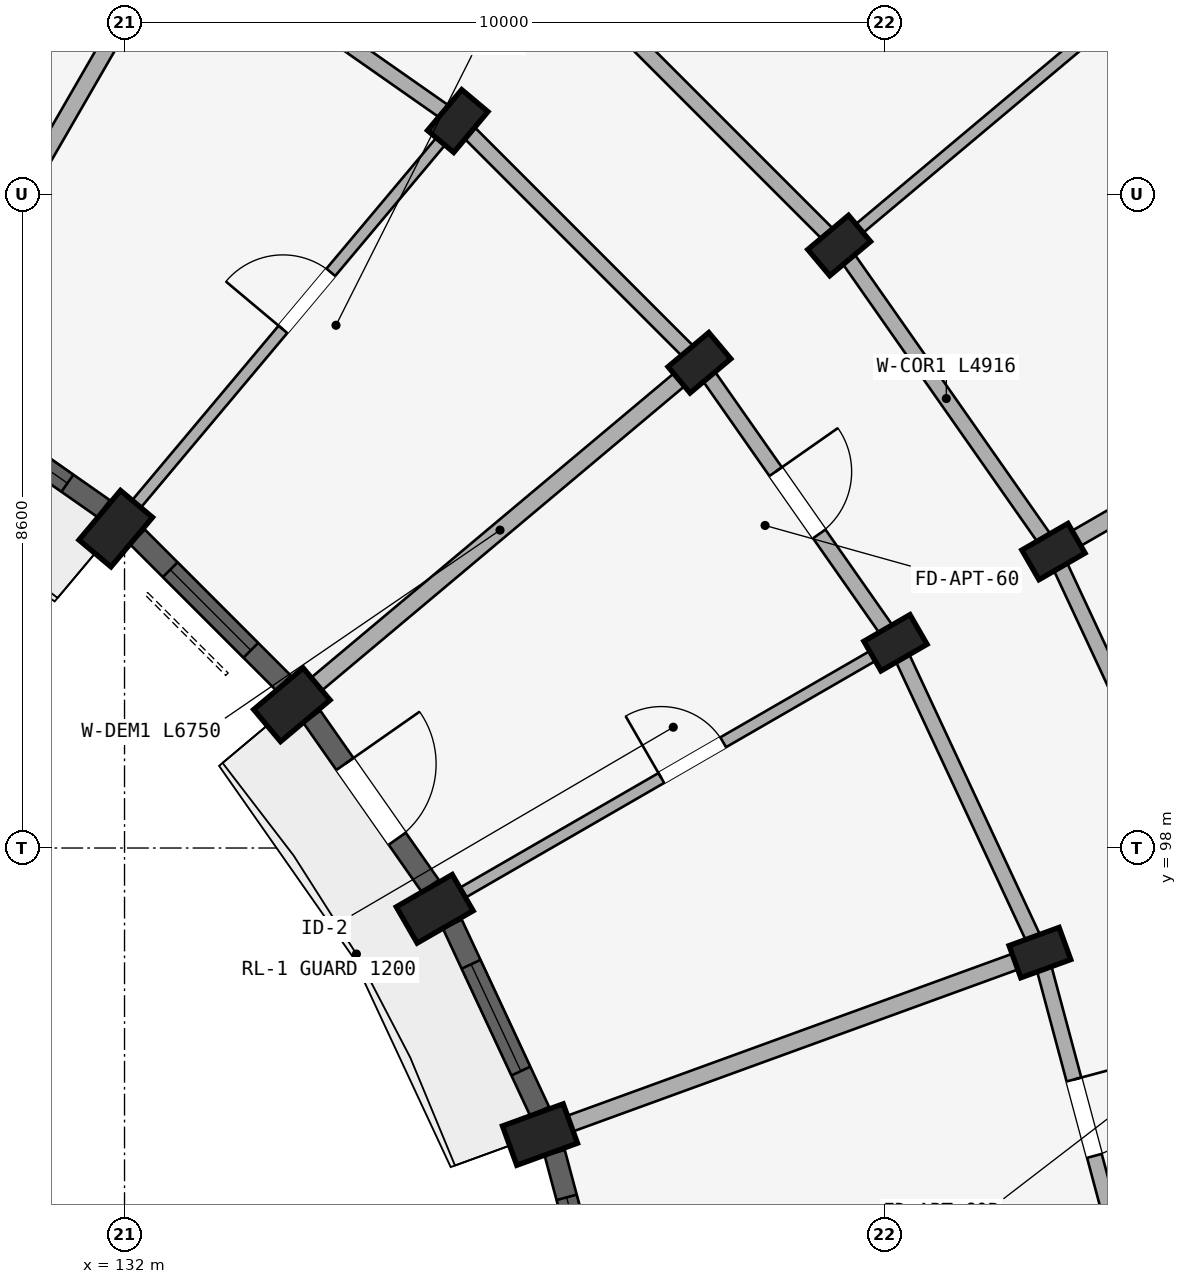
"""IFC4 building model, lengths in metres.
Left out: names, types, materials, properties, quantities, classifications, styles, units other than length and angle.
Written with IfcOpenShell. Run it as: python <this file> out.ifc"""

import sys

from ifc_helpers import new_model, si_unit, direction, frame, frame_2d, origin, origin_2d, place, context, subcontext, project, spatial, rectangle, extrude, element, fill, save


model = new_model("IFC4")
c1 = context("Model", 3, precision=1e-05, world=origin(), true_north=direction((0.0, 1.0)))
c2 = subcontext(c1, "Body", "Model", "MODEL_VIEW")
j1 = project(units=[si_unit("LENGTHUNIT", "METRE"), si_unit("PLANEANGLEUNIT", "RADIAN")], contexts=[c1])
p1 = place(None, origin())
s1 = spatial("IfcSite", under=j1, at=p1, CompositionType="ELEMENT")
p2 = place(p1, origin())
s2 = spatial("IfcBuilding", under=s1, at=p2, CompositionType="ELEMENT")
p3 = place(p2, frame((0.0, 0.0, 11.85)))
s3 = spatial("IfcBuildingStorey", under=s2, at=p3, CompositionType="ELEMENT", Elevation=11.85)
p4 = place(p3, frame((131.885, 102.202, 0.0), z_axis=(0.0, 0.0, 1.0), x_axis=(-0.766044443119, 0.642787609687, 0.0)))
e1 = element("IfcColumn", 1, at=p4, inside=s3, PredefinedType="COLUMN", context=c2, shape_type="SweptSolid", body=[
    extrude(rectangle(XDim=0.55, YDim=0.85, at=origin_2d()), origin(), (0.0, 0.0, 1.0), 2.93),
])
p5 = place(p3, frame((136.384, 107.564, 0.0), z_axis=(0.0, 0.0, 1.0), x_axis=(-0.766044443119, 0.642787609687, 0.0)))
e2 = element("IfcColumn", 2, at=p5, inside=s3, PredefinedType="COLUMN", context=c2, shape_type="SweptSolid", body=[
    extrude(rectangle(XDim=0.45, YDim=0.7, at=origin_2d()), origin(), (0.0, 0.0, 1.0), 2.93),
])
p6 = place(p3, frame((134.202, 99.885, 0.0), z_axis=(0.0, 0.0, 1.0), x_axis=(-0.642787609687, 0.766044443119, 0.0)))
e3 = element("IfcColumn", 3, at=p6, inside=s3, PredefinedType="COLUMN", context=c2, shape_type="SweptSolid", body=[
    extrude(rectangle(XDim=0.55, YDim=0.85, at=origin_2d()), origin(), (0.0, 0.0, 1.0), 2.93),
])
for number, where, z_axis, x_axis in (
    (4, (139.564, 104.384, 0.0), (0.0, 0.0, 1.0), (-0.643, 0.766, 0.0)),
    (5, (141.402, 105.927, 0.0), (0.0, 0.0, 1.0), (-0.643, 0.766, 0.0)),
):
    element("IfcColumn", number, at=place(p3, frame(where, z_axis=z_axis, x_axis=x_axis)), inside=s3, PredefinedType="COLUMN", context=c2, shape_type="SweptSolid", body=[
        extrude(rectangle(XDim=0.45, YDim=0.7, at=origin_2d()), origin(), (0.0, 0.0, 1.0), 2.93),
    ])
p7 = place(p3, frame((136.081, 97.2, 0.0), z_axis=(0.0, 0.0, 1.0), x_axis=(-0.5, 0.866025403784, 0.0)))
e6 = element("IfcColumn", 6, at=p7, inside=s3, PredefinedType="COLUMN", context=c2, shape_type="SweptSolid", body=[
    extrude(rectangle(XDim=0.55, YDim=0.85, at=origin_2d()), origin(), (0.0, 0.0, 1.0), 2.93),
])
for number, where, z_axis, x_axis in (
    (7, (142.144, 100.7, 0.0), (0.0, 0.0, 1.0), (-0.5, 0.866, 0.0)),
    (8, (144.222, 101.9, 0.0), (0.0, 0.0, 1.0), (-0.5, 0.866, 0.0)),
):
    element("IfcColumn", number, at=place(p3, frame(where, z_axis=z_axis, x_axis=x_axis)), inside=s3, PredefinedType="COLUMN", context=c2, shape_type="SweptSolid", body=[
        extrude(rectangle(XDim=0.45, YDim=0.7, at=origin_2d()), origin(), (0.0, 0.0, 1.0), 2.93),
    ])
p8 = place(p3, frame((137.466, 94.23, 0.0), z_axis=(0.0, 0.0, 1.0), x_axis=(-0.342020143326, 0.939692620786, 0.0)))
e9 = element("IfcColumn", 9, at=p8, inside=s3, PredefinedType="COLUMN", context=c2, shape_type="SweptSolid", body=[
    extrude(rectangle(XDim=0.55, YDim=0.85, at=origin_2d()), origin(), (0.0, 0.0, 1.0), 2.93),
])
p9 = place(p3, frame((144.044, 96.624, 0.0), z_axis=(0.0, 0.0, 1.0), x_axis=(-0.342020143326, 0.939692620786, 0.0)))
e10 = element("IfcColumn", 10, at=p9, inside=s3, PredefinedType="COLUMN", context=c2, shape_type="SweptSolid", body=[
    extrude(rectangle(XDim=0.45, YDim=0.7, at=origin_2d()), origin(), (0.0, 0.0, 1.0), 2.93),
])
p10 = place(p3, frame((132.7, 110.144, 0.0), z_axis=(0.0, 0.0, 1.0), x_axis=(0.819155404658, -0.573571637217, 0.0)))
e11 = element("IfcWall", 11, at=p10, inside=s3, PredefinedType="STANDARD", context=c2, shape_type="SweptSolid", body=[
    extrude(rectangle(XDim=4.497, YDim=0.2, at=frame_2d((2.249, 0.0))), origin(), (0.0, 0.0, 1.0), 2.372),
])
p11 = place(p10, frame((1.709, 0.0, 0.0)))
e12 = element("IfcOpeningElement", 12, at=p11, cuts=e11, PredefinedType="OPENING", context=c2, shape_type="SweptSolid", body=[
    extrude(rectangle(XDim=1.08, YDim=2.15, at=frame_2d((0.54, 1.075))), frame((0.0, 0.11, 0.0), z_axis=(0.0, -1.0, 0.0), x_axis=(1.0, 0.0, 0.0)), (0.0, 0.0, 1.0), 0.22),
])
p12 = place(p3, frame((136.384, 107.564, 0.0), z_axis=(0.0, 0.0, 1.0), x_axis=(0.707106781187, -0.707106781187, 0.0)))
e13 = element("IfcWall", 13, at=p12, inside=s3, PredefinedType="STANDARD", context=c2, shape_type="SweptSolid", body=[
    extrude(rectangle(XDim=4.497, YDim=0.2, at=frame_2d((2.249, 0.0))), origin(), (0.0, 0.0, 1.0), 2.372),
])
p13 = place(p3, frame((137.927, 109.402, 0.0), z_axis=(0.0, 0.0, 1.0), x_axis=(0.707106781187, -0.707106781187, 0.0)))
e14 = element("IfcWall", 14, at=p13, inside=s3, PredefinedType="STANDARD", context=c2, shape_type="SweptSolid", body=[
    extrude(rectangle(XDim=4.916, YDim=0.2, at=frame_2d((2.458, 0.0))), origin(), (0.0, 0.0, 1.0), 2.372),
])
p14 = place(p3, frame((139.564, 104.384, 0.0), z_axis=(0.0, 0.0, 1.0), x_axis=(0.573571637217, -0.819155404658, 0.0)))
e15 = element("IfcWall", 15, at=p14, inside=s3, PredefinedType="STANDARD", context=c2, shape_type="SweptSolid", body=[
    extrude(rectangle(XDim=4.497, YDim=0.2, at=frame_2d((2.249, 0.0))), origin(), (0.0, 0.0, 1.0), 2.372),
])
p15 = place(p14, frame((1.749, 0.0, 0.0)))
e16 = element("IfcOpeningElement", 16, at=p15, cuts=e15, PredefinedType="OPENING", context=c2, shape_type="SweptSolid", body=[
    extrude(rectangle(XDim=1.0, YDim=2.15, at=frame_2d((0.5, 1.075))), frame((0.0, 0.11, 0.0), z_axis=(0.0, -1.0, 0.0), x_axis=(1.0, 0.0, 0.0)), (0.0, 0.0, 1.0), 0.22),
])
p16 = place(p3, frame((141.402, 105.927, 0.0), z_axis=(0.0, 0.0, 1.0), x_axis=(0.573592335331, -0.819140911474, 0.0)))
e17 = element("IfcWall", 17, at=p16, inside=s3, PredefinedType="STANDARD", context=c2, shape_type="SweptSolid", body=[
    extrude(rectangle(XDim=4.916, YDim=0.2, at=frame_2d((2.458, 0.0))), origin(), (0.0, 0.0, 1.0), 2.372),
])
p17 = place(p3, frame((142.144, 100.7, 0.0), z_axis=(0.0, 0.0, 1.0), x_axis=(0.422617978463, -0.906307919131, 0.0)))
e18 = element("IfcWall", 18, at=p17, inside=s3, PredefinedType="STANDARD", context=c2, shape_type="SweptSolid", body=[
    extrude(rectangle(XDim=4.497, YDim=0.2, at=frame_2d((2.249, 0.0))), origin(), (0.0, 0.0, 1.0), 2.372),
])
p18 = place(p3, frame((144.222, 101.9, 0.0), z_axis=(0.0, 0.0, 1.0), x_axis=(0.422629854778, -0.906302381024, 0.0)))
e19 = element("IfcWall", 19, at=p18, inside=s3, PredefinedType="STANDARD", context=c2, shape_type="SweptSolid", body=[
    extrude(rectangle(XDim=4.915, YDim=0.2, at=frame_2d((2.458, 0.0))), origin(), (0.0, 0.0, 1.0), 2.372),
])
p19 = place(p18, frame((1.958, 0.0, 0.0)))
e20 = element("IfcOpeningElement", 20, at=p19, cuts=e19, PredefinedType="OPENING", context=c2, shape_type="SweptSolid", body=[
    extrude(rectangle(XDim=1.0, YDim=2.15, at=frame_2d((0.5, 1.075))), frame((0.0, 0.11, 0.0), z_axis=(0.0, -1.0, 0.0), x_axis=(1.0, 0.0, 0.0)), (0.0, 0.0, 1.0), 0.22),
])
p20 = place(p3, frame((144.044, 96.624, 0.0), z_axis=(0.0, 0.0, 1.0), x_axis=(0.258787642463, -0.965934240054, 0.0)))
e21 = element("IfcWall", 21, at=p20, inside=s3, PredefinedType="STANDARD", context=c2, shape_type="SweptSolid", body=[
    extrude(rectangle(XDim=4.497, YDim=0.2, at=frame_2d((2.249, 0.0))), origin(), (0.0, 0.0, 1.0), 2.372),
])
p21 = place(p20, frame((1.729, 0.0, 0.0)))
e22 = element("IfcOpeningElement", 22, at=p21, cuts=e21, PredefinedType="OPENING", context=c2, shape_type="SweptSolid", body=[
    extrude(rectangle(XDim=1.04, YDim=2.15, at=frame_2d((0.52, 1.075))), frame((0.0, 0.11, 0.0), z_axis=(0.0, -1.0, 0.0), x_axis=(1.0, 0.0, 0.0)), (0.0, 0.0, 1.0), 0.22),
])
p22 = place(p3, frame((129.3, 104.254, 0.0), z_axis=(0.0, 0.0, 1.0), x_axis=(0.499997969693, 0.866026575979, 0.0)))
e23 = element("IfcWall", 23, at=p22, inside=s3, PredefinedType="STANDARD", context=c2, shape_type="SweptSolid", body=[
    extrude(rectangle(XDim=6.75, YDim=0.22, at=frame_2d((3.375, 0.0))), origin(), (0.0, 0.0, 1.0), 2.372),
])
p23 = place(p3, frame((132.013, 102.355, 0.0), z_axis=(0.0, 0.0, 1.0), x_axis=(0.642784846501, 0.766046761698, 0.0)))
e24 = element("IfcWall", 24, at=p23, inside=s3, PredefinedType="PARTITIONING", context=c2, shape_type="SweptSolid", body=[
    extrude(rectangle(XDim=6.75, YDim=0.15, at=frame_2d((3.375, 0.0))), origin(), (0.0, 0.0, 1.0), 2.372),
])
p24 = place(p23, frame((3.222, 0.0, 0.0)))
e25 = element("IfcOpeningElement", 25, at=p24, cuts=e24, PredefinedType="OPENING", context=c2, shape_type="SweptSolid", body=[
    extrude(rectangle(XDim=0.98, YDim=2.12, at=frame_2d((0.49, 1.06))), frame((0.0, 0.085, 0.0), z_axis=(0.0, -1.0, 0.0), x_axis=(1.0, 0.0, 0.0)), (0.0, 0.0, 1.0), 0.17),
])
p25 = place(p3, frame((134.355, 100.013, 0.0), z_axis=(0.0, 0.0, 1.0), x_axis=(0.766046761698, 0.642784846501, 0.0)))
e26 = element("IfcWall", 26, at=p25, inside=s3, PredefinedType="STANDARD", context=c2, shape_type="SweptSolid", body=[
    extrude(rectangle(XDim=6.75, YDim=0.22, at=frame_2d((3.375, 0.0))), origin(), (0.0, 0.0, 1.0), 2.372),
])
p26 = place(p3, frame((141.479, 105.991, 0.0), z_axis=(0.0, 0.0, 1.0), x_axis=(0.766046835987, 0.642784757967, 0.0)))
e27 = element("IfcWall", 27, at=p26, inside=s3, PredefinedType="PARTITIONING", context=c2, shape_type="SweptSolid", body=[
    extrude(rectangle(XDim=17.42, YDim=0.15, at=frame_2d((8.71, 0.0))), origin(), (0.0, 0.0, 1.0), 2.372),
])
p27 = place(p26, frame((4.45, 0.0, 0.0)))
e28 = element("IfcOpeningElement", 28, at=p27, cuts=e27, PredefinedType="OPENING", context=c2, shape_type="SweptSolid", body=[
    extrude(rectangle(XDim=0.8, YDim=2.1, at=frame_2d((0.4, 1.05))), frame((0.0, 0.085, 0.0), z_axis=(0.0, -1.0, 0.0), x_axis=(1.0, 0.0, 0.0)), (0.0, 0.0, 1.0), 0.17),
])
p28 = place(p3, frame((136.254, 97.3, 0.0), z_axis=(0.0, 0.0, 1.0), x_axis=(0.866026575979, 0.499997969693, 0.0)))
e29 = element("IfcWall", 29, at=p28, inside=s3, PredefinedType="PARTITIONING", context=c2, shape_type="SweptSolid", body=[
    extrude(rectangle(XDim=6.75, YDim=0.15, at=frame_2d((3.375, 0.0))), origin(), (0.0, 0.0, 1.0), 2.372),
])
p29 = place(p28, frame((3.242, 0.0, 0.0)))
e30 = element("IfcOpeningElement", 30, at=p29, cuts=e29, PredefinedType="OPENING", context=c2, shape_type="SweptSolid", body=[
    extrude(rectangle(XDim=0.94, YDim=2.1, at=frame_2d((0.47, 1.05))), frame((0.0, 0.085, 0.0), z_axis=(0.0, -1.0, 0.0), x_axis=(1.0, 0.0, 0.0)), (0.0, 0.0, 1.0), 0.17),
])
p30 = place(p3, frame((144.309, 101.95, 0.0), z_axis=(0.0, 0.0, 1.0), x_axis=(0.866026648973, 0.499997843263, 0.0)))
e31 = element("IfcWall", 31, at=p30, inside=s3, PredefinedType="STANDARD", context=c2, shape_type="SweptSolid", body=[
    extrude(rectangle(XDim=17.42, YDim=0.23, at=frame_2d((8.71, 0.0))), origin(), (0.0, 0.0, 1.0), 2.372),
])
p31 = place(p3, frame((137.654, 94.298, 0.0), z_axis=(0.0, 0.0, 1.0), x_axis=(0.939696231917, 0.342010221662, 0.0)))
e32 = element("IfcWall", 32, at=p31, inside=s3, PredefinedType="STANDARD", context=c2, shape_type="SweptSolid", body=[
    extrude(rectangle(XDim=6.75, YDim=0.22, at=frame_2d((3.375, 0.0))), origin(), (0.0, 0.0, 1.0), 2.372),
])
p32 = place(p3, frame((129.501, 104.023, 0.0), z_axis=(0.0, 0.0, 1.0), x_axis=(0.81917282593, -0.573546755948, 0.0)))
e33 = element("IfcWall", 33, at=p32, inside=s3, PredefinedType="STANDARD", context=c2, shape_type="SweptSolid", body=[
    extrude(rectangle(XDim=2.718, YDim=0.275, at=frame_2d((1.359, 0.0))), origin(), (0.0, 0.0, 1.0), 2.422),
])
p33 = place(p32, frame((0.584, 0.0, 0.622)))
e34 = element("IfcOpeningElement", 34, at=p33, cuts=e33, PredefinedType="OPENING", context=c2, shape_type="SweptSolid", body=[
    extrude(rectangle(XDim=1.55, YDim=1.6, at=frame_2d((0.775, 0.8))), frame((0.0, 0.147, 0.0), z_axis=(0.0, -1.0, 0.0), x_axis=(1.0, 0.0, 0.0)), (0.0, 0.0, 1.0), 0.295),
])
p34 = place(p3, frame((132.171, 102.092, 0.0), z_axis=(0.0, 0.0, 1.0), x_axis=(0.707106781187, -0.707106781187, 0.0)))
e35 = element("IfcWall", 35, at=p34, inside=s3, PredefinedType="STANDARD", context=c2, shape_type="SweptSolid", body=[
    extrude(rectangle(XDim=2.718, YDim=0.275, at=frame_2d((1.359, 0.0))), origin(), (0.0, 0.0, 1.0), 2.422),
])
p35 = place(p34, frame((0.609, 0.0, 0.572)))
e36 = element("IfcOpeningElement", 36, at=p35, cuts=e35, PredefinedType="OPENING", context=c2, shape_type="SweptSolid", body=[
    extrude(rectangle(XDim=1.5, YDim=1.65, at=frame_2d((0.75, 0.825))), frame((0.0, 0.147, 0.0), z_axis=(0.0, -1.0, 0.0), x_axis=(1.0, 0.0, 0.0)), (0.0, 0.0, 1.0), 0.295),
])
p36 = place(p3, frame((134.465, 99.727, 0.0), z_axis=(0.0, 0.0, 1.0), x_axis=(0.573546755948, -0.81917282593, 0.0)))
e37 = element("IfcWall", 37, at=p36, inside=s3, PredefinedType="STANDARD", context=c2, shape_type="SweptSolid", body=[
    extrude(rectangle(XDim=2.718, YDim=0.275, at=frame_2d((1.359, 0.0))), origin(), (0.0, 0.0, 1.0), 2.422),
])
p37 = place(p36, frame((0.759, 0.0, 0.0)))
e38 = element("IfcOpeningElement", 38, at=p37, cuts=e37, PredefinedType="OPENING", context=c2, shape_type="SweptSolid", body=[
    extrude(rectangle(XDim=1.2, YDim=2.15, at=frame_2d((0.6, 1.075))), frame((0.0, 0.147, 0.0), z_axis=(0.0, -1.0, 0.0), x_axis=(1.0, 0.0, 0.0)), (0.0, 0.0, 1.0), 0.295),
])
p38 = place(p3, frame((136.313, 96.999, 0.0), z_axis=(0.0, 0.0, 1.0), x_axis=(0.422610022166, -0.906311629168, 0.0)))
e39 = element("IfcWall", 39, at=p38, inside=s3, PredefinedType="STANDARD", context=c2, shape_type="SweptSolid", body=[
    extrude(rectangle(XDim=2.718, YDim=0.275, at=frame_2d((1.359, 0.0))), origin(), (0.0, 0.0, 1.0), 2.422),
])
p39 = place(p38, frame((0.584, 0.0, 0.622)))
e40 = element("IfcOpeningElement", 40, at=p39, cuts=e39, PredefinedType="OPENING", context=c2, shape_type="SweptSolid", body=[
    extrude(rectangle(XDim=1.55, YDim=1.6, at=frame_2d((0.775, 0.8))), frame((0.0, 0.147, 0.0), z_axis=(0.0, -1.0, 0.0), x_axis=(1.0, 0.0, 0.0)), (0.0, 0.0, 1.0), 0.295),
])
p40 = place(p3, frame((137.659, 93.992, 0.0), z_axis=(0.0, 0.0, 1.0), x_axis=(0.258819907011, -0.965925595341, 0.0)))
e41 = element("IfcWall", 41, at=p40, inside=s3, PredefinedType="STANDARD", context=c2, shape_type="SweptSolid", body=[
    extrude(rectangle(XDim=2.718, YDim=0.275, at=frame_2d((1.359, 0.0))), origin(), (0.0, 0.0, 1.0), 2.422),
])
p41 = place(p40, frame((0.609, 0.0, 0.572)))
e42 = element("IfcOpeningElement", 42, at=p41, cuts=e41, PredefinedType="OPENING", context=c2, shape_type="SweptSolid", body=[
    extrude(rectangle(XDim=1.5, YDim=1.65, at=frame_2d((0.75, 0.825))), frame((0.0, 0.147, 0.0), z_axis=(0.0, -1.0, 0.0), x_axis=(1.0, 0.0, 0.0)), (0.0, 0.0, 1.0), 0.295),
])
p42 = place(p33, origin())
e43 = element("IfcWindow", 43, at=p42, inside=s3, PartitioningType="DOUBLE_PANEL_VERTICAL", PredefinedType="WINDOW", context=c2, shape_type="SweptSolid", body=[
    extrude(rectangle(XDim=1.55, YDim=1.6, at=frame_2d((0.775, 0.8))), frame((0.0, 0.03, 0.0), z_axis=(0.0, -1.0, 0.0), x_axis=(1.0, 0.0, 0.0)), (0.0, 0.0, 1.0), 0.06),
])
fill(e34, e43)
p43 = place(p35, origin())
e44 = element("IfcWindow", 44, at=p43, inside=s3, PartitioningType="DOUBLE_PANEL_VERTICAL", PredefinedType="WINDOW", context=c2, shape_type="SweptSolid", body=[
    extrude(rectangle(XDim=1.5, YDim=1.65, at=frame_2d((0.75, 0.825))), frame((0.0, 0.03, 0.0), z_axis=(0.0, -1.0, 0.0), x_axis=(1.0, 0.0, 0.0)), (0.0, 0.0, 1.0), 0.06),
])
fill(e36, e44)
p44 = place(p39, origin())
e45 = element("IfcWindow", 45, at=p44, inside=s3, PartitioningType="DOUBLE_PANEL_VERTICAL", PredefinedType="WINDOW", context=c2, shape_type="SweptSolid", body=[
    extrude(rectangle(XDim=1.55, YDim=1.6, at=frame_2d((0.775, 0.8))), frame((0.0, 0.03, 0.0), z_axis=(0.0, -1.0, 0.0), x_axis=(1.0, 0.0, 0.0)), (0.0, 0.0, 1.0), 0.06),
])
fill(e40, e45)
p45 = place(p41, origin())
e46 = element("IfcWindow", 46, at=p45, inside=s3, PartitioningType="DOUBLE_PANEL_VERTICAL", PredefinedType="WINDOW", context=c2, shape_type="SweptSolid", body=[
    extrude(rectangle(XDim=1.5, YDim=1.65, at=frame_2d((0.75, 0.825))), frame((0.0, 0.03, 0.0), z_axis=(0.0, -1.0, 0.0), x_axis=(1.0, 0.0, 0.0)), (0.0, 0.0, 1.0), 0.06),
])
fill(e42, e46)
p46 = place(p24, origin())
e47 = element("IfcDoor", 47, at=p46, inside=s3, OperationType="SINGLE_SWING_LEFT", PredefinedType="DOOR", context=c2, shape_type="SweptSolid", body=[
    extrude(rectangle(XDim=0.98, YDim=2.12, at=frame_2d((0.49, 1.06))), frame((0.0, 0.025, 0.0), z_axis=(0.0, -1.0, 0.0), x_axis=(1.0, 0.0, 0.0)), (0.0, 0.0, 1.0), 0.05),
])
fill(e25, e47)
p47 = place(p29, frame((0.94, 0.0, 0.0), z_axis=(0.0, 0.0, 1.0), x_axis=(-1.0, 0.0, 0.0)))
e48 = element("IfcDoor", 48, at=p47, inside=s3, OperationType="SINGLE_SWING_RIGHT", PredefinedType="DOOR", context=c2, shape_type="SweptSolid", body=[
    extrude(rectangle(XDim=0.94, YDim=2.1, at=frame_2d((0.47, 1.05))), frame((0.0, 0.025, 0.0), z_axis=(0.0, -1.0, 0.0), x_axis=(1.0, 0.0, 0.0)), (0.0, 0.0, 1.0), 0.05),
])
fill(e30, e48)
p48 = place(p15, origin())
e49 = element("IfcDoor", 49, at=p48, inside=s3, OperationType="SINGLE_SWING_LEFT", PredefinedType="DOOR", context=c2, shape_type="SweptSolid", body=[
    extrude(rectangle(XDim=1.0, YDim=2.15, at=frame_2d((0.5, 1.075))), frame((0.0, 0.025, 0.0), z_axis=(0.0, -1.0, 0.0), x_axis=(1.0, 0.0, 0.0)), (0.0, 0.0, 1.0), 0.05),
])
fill(e16, e49)
p49 = place(p21, frame((1.04, 0.0, 0.0), z_axis=(0.0, 0.0, 1.0), x_axis=(-1.0, 0.0, 0.0)))
e50 = element("IfcDoor", 50, at=p49, inside=s3, OperationType="SINGLE_SWING_RIGHT", PredefinedType="DOOR", context=c2, shape_type="SweptSolid", body=[
    extrude(rectangle(XDim=1.04, YDim=2.15, at=frame_2d((0.52, 1.075))), frame((0.0, 0.025, 0.0), z_axis=(0.0, -1.0, 0.0), x_axis=(1.0, 0.0, 0.0)), (0.0, 0.0, 1.0), 0.05),
])
fill(e22, e50)
p50 = place(p37, frame((1.2, 0.0, 0.0), z_axis=(0.0, 0.0, 1.0), x_axis=(-1.0, 0.0, 0.0)))
e51 = element("IfcDoor", 51, at=p50, inside=s3, OperationType="SINGLE_SWING_RIGHT", PredefinedType="DOOR", context=c2, shape_type="SweptSolid", body=[
    extrude(rectangle(XDim=1.2, YDim=2.15, at=frame_2d((0.6, 1.075))), frame((0.0, 0.025, 0.0), z_axis=(0.0, -1.0, 0.0), x_axis=(1.0, 0.0, 0.0)), (0.0, 0.0, 1.0), 0.05),
])
fill(e38, e51)
save(model, sys.argv[1])
